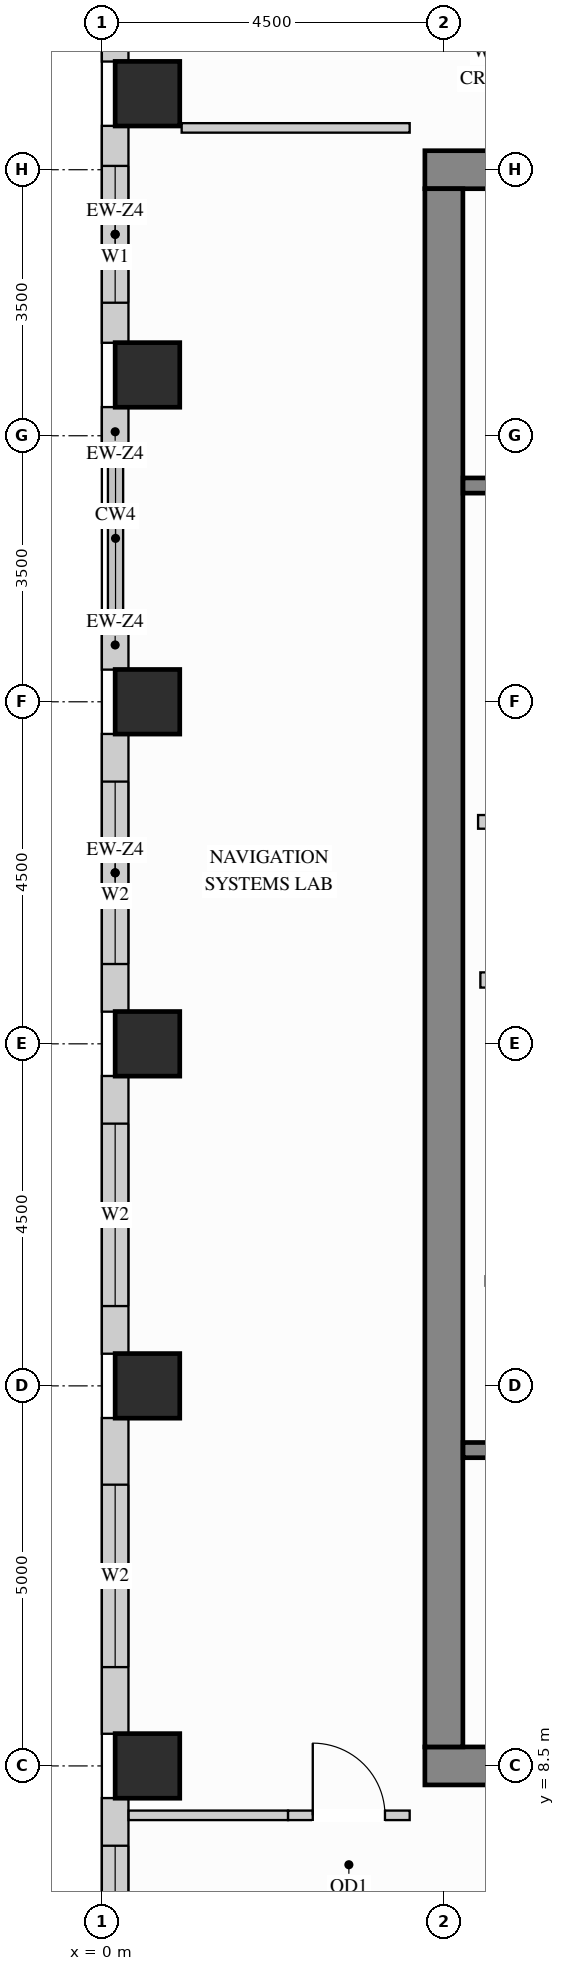
"""IFC4 building model, lengths in metres.
Left out: names, types, materials, properties, quantities, classifications, styles, units other than length and angle.
Written with IfcOpenShell. Run it as: python <this file> out.ifc"""

import sys

from ifc_helpers import new_model, si_unit, direction, frame, frame_2d, origin, origin_2d, place, context, subcontext, project, spatial, rectangle, extrude, source, transform, mapped, element, fill, save


model = new_model("IFC4")
c1 = context("Model", 3, precision=1e-05, world=origin(), true_north=direction((0.0, 1.0)))
c2 = subcontext(c1, "Body", "Model", "MODEL_VIEW")
j1 = project(units=[si_unit("LENGTHUNIT", "METRE"), si_unit("PLANEANGLEUNIT", "RADIAN")], contexts=[c1])
p1 = place(None, origin())
s1 = spatial("IfcSite", under=j1, at=p1, CompositionType="ELEMENT")
p2 = place(p1, origin())
s2 = spatial("IfcBuilding", under=s1, at=p2, CompositionType="ELEMENT")
p3 = place(p2, frame((0.0, 0.0, 212.4)))
s3 = spatial("IfcBuildingStorey", under=s2, at=p3, CompositionType="ELEMENT", Elevation=212.4)
m1 = source(origin(), c2, "Body", "SweptSolid", [
    extrude(rectangle(XDim=0.85, YDim=0.85, at=origin_2d()), origin(), (0.0, 0.0, 1.0), 3.4),
])
for number, where, z_axis, x_axis in (
    (1, (0.6, 13.5, 0.0), (0.0, 0.0, 1.0), (1.0, 0.0, 0.0)),
    (2, (0.6, 18.0, 0.0), (0.0, 0.0, 1.0), (1.0, 0.0, 0.0)),
    (3, (0.6, 22.5, 0.0), (0.0, 0.0, 1.0), (1.0, 0.0, 0.0)),
    (4, (0.6, 26.8, 0.0), (0.0, 0.0, 1.0), (1.0, 0.0, 0.0)),
    (5, (0.6, 30.5, 0.0), (0.0, 0.0, 1.0), (1.0, 0.0, 0.0)),
    (6, (0.6, 8.5, 0.0), (0.0, 0.0, 1.0), (1.0, 0.0, 0.0)),
):
    element("IfcColumn", number, at=place(p3, frame(where, z_axis=z_axis, x_axis=x_axis)), inside=s3, PredefinedType="COLUMN", context=c2, shape_type="MappedRepresentation", body=[
        mapped(m1, transform((0.0, 0.0, 0.0), x_axis=(1.0, 0.0, 0.0), y_axis=(0.0, 1.0, 0.0), z_axis=(0.0, 0.0, 1.0))),
    ])
m2 = source(origin(), c2, "Body", "SweptSolid", [
    extrude(rectangle(XDim=10.5, YDim=0.5, at=frame_2d((5.25, 0.0))), origin(), (0.0, 0.0, 1.0), 3.4),
])
for number, where, z_axis, x_axis in (
    (7, (4.25, 29.5, 0.0), (0.0, 0.0, 1.0), (1.0, 0.0, 0.0)),
    (8, (4.25, 8.5, 0.0), (0.0, 0.0, 1.0), (1.0, 0.0, 0.0)),
):
    element("IfcWall", number, at=place(p3, frame(where, z_axis=z_axis, x_axis=x_axis)), inside=s3, PredefinedType="SHEAR", context=c2, shape_type="MappedRepresentation", body=[
        mapped(m2, transform((0.0, 0.0, 0.0), x_axis=(1.0, 0.0, 0.0), y_axis=(0.0, 1.0, 0.0), z_axis=(0.0, 0.0, 1.0))),
    ])
m3 = source(origin(), c2, "Body", "SweptSolid", [
    extrude(rectangle(XDim=20.5, YDim=0.5, at=frame_2d((10.25, 0.0))), origin(), (0.0, 0.0, 1.0), 3.4),
])
p4 = place(p3, frame((4.5, 8.75, 0.0), z_axis=(0.0, 0.0, 1.0), x_axis=(0.0, 1.0, 0.0)))
e9 = element("IfcWall", 9, at=p4, inside=s3, PredefinedType="SHEAR", context=c2, shape_type="MappedRepresentation", body=[
    mapped(m3, transform((0.0, 0.0, 0.0), x_axis=(1.0, 0.0, 0.0), y_axis=(0.0, 1.0, 0.0), z_axis=(0.0, 0.0, 1.0))),
])
p5 = place(p3, frame((0.175, 34.577, 0.0), z_axis=(0.0, 0.0, 1.0), x_axis=(0.0, -1.0, 0.0)))
e10 = element("IfcWall", 10, at=p5, inside=s3, PredefinedType="SOLIDWALL", context=c2, shape_type="SweptSolid", body=[
    extrude(rectangle(XDim=3.654, YDim=0.35, at=frame_2d((1.827, 0.0))), origin(), (0.0, 0.0, 1.0), 3.385),
])
p6 = place(p5, frame((0.648, 0.0, 0.78)))
e11 = element("IfcOpeningElement", 11, at=p6, cuts=e10, PredefinedType="OPENING", context=c2, shape_type="SweptSolid", body=[
    extrude(rectangle(XDim=1.8, YDim=2.1, at=frame_2d((0.9, 1.05))), frame((0.0, 0.185, 0.0), z_axis=(0.0, -1.0, 0.0), x_axis=(1.0, 0.0, 0.0)), (0.0, 0.0, 1.0), 0.37),
])
p7 = place(p3, frame((0.175, 30.077, 0.0), z_axis=(0.0, 0.0, 1.0), x_axis=(0.0, -1.0, 0.0)))
e12 = element("IfcWall", 12, at=p7, inside=s3, PredefinedType="SOLIDWALL", context=c2, shape_type="SweptSolid", body=[
    extrude(rectangle(XDim=2.854, YDim=0.35, at=frame_2d((1.427, 0.0))), origin(), (0.0, 0.0, 1.0), 3.385),
])
p8 = place(p7, frame((0.527, 0.0, 0.78)))
e13 = element("IfcOpeningElement", 13, at=p8, cuts=e12, PredefinedType="OPENING", context=c2, shape_type="SweptSolid", body=[
    extrude(rectangle(XDim=1.8, YDim=2.1, at=frame_2d((0.9, 1.05))), frame((0.0, 0.185, 0.0), z_axis=(0.0, -1.0, 0.0), x_axis=(1.0, 0.0, 0.0)), (0.0, 0.0, 1.0), 0.37),
])
m4 = source(origin(), c2, "Body", "SweptSolid", [
    extrude(rectangle(XDim=0.527, YDim=0.35, at=frame_2d((0.263, 0.0))), origin(), (0.0, 0.0, 1.0), 3.385),
])
for number, where, z_axis, x_axis in (
    (14, (0.175, 26.377, 0.0), (0.0, 0.0, 1.0), (0.0, -1.0, 0.0)),
    (15, (0.175, 23.45, 0.0), (0.0, 0.0, 1.0), (0.0, -1.0, 0.0)),
):
    element("IfcWall", number, at=place(p3, frame(where, z_axis=z_axis, x_axis=x_axis)), inside=s3, PredefinedType="SOLIDWALL", context=c2, shape_type="MappedRepresentation", body=[
        mapped(m4, transform((0.0, 0.0, 0.0), x_axis=(1.0, 0.0, 0.0), y_axis=(0.0, 1.0, 0.0), z_axis=(0.0, 0.0, 1.0))),
    ])
p9 = place(p3, frame((0.175, 22.077, 0.0), z_axis=(0.0, 0.0, 1.0), x_axis=(0.0, -1.0, 0.0)))
e16 = element("IfcWall", 16, at=p9, inside=s3, PredefinedType="SOLIDWALL", context=c2, shape_type="SweptSolid", body=[
    extrude(rectangle(XDim=3.654, YDim=0.35, at=frame_2d((1.827, 0.0))), origin(), (0.0, 0.0, 1.0), 3.385),
])
p10 = place(p9, frame((0.627, 0.0, 0.78)))
e17 = element("IfcOpeningElement", 17, at=p10, cuts=e16, PredefinedType="OPENING", context=c2, shape_type="SweptSolid", body=[
    extrude(rectangle(XDim=2.4, YDim=2.1, at=frame_2d((1.2, 1.05))), frame((0.0, 0.185, 0.0), z_axis=(0.0, -1.0, 0.0), x_axis=(1.0, 0.0, 0.0)), (0.0, 0.0, 1.0), 0.37),
])
p11 = place(p3, frame((0.175, 17.577, 0.0), z_axis=(0.0, 0.0, 1.0), x_axis=(0.0, -1.0, 0.0)))
e18 = element("IfcWall", 18, at=p11, inside=s3, PredefinedType="SOLIDWALL", context=c2, shape_type="SweptSolid", body=[
    extrude(rectangle(XDim=3.654, YDim=0.35, at=frame_2d((1.827, 0.0))), origin(), (0.0, 0.0, 1.0), 3.385),
])
p12 = place(p11, frame((0.627, 0.0, 0.78)))
e19 = element("IfcOpeningElement", 19, at=p12, cuts=e18, PredefinedType="OPENING", context=c2, shape_type="SweptSolid", body=[
    extrude(rectangle(XDim=2.4, YDim=2.1, at=frame_2d((1.2, 1.05))), frame((0.0, 0.185, 0.0), z_axis=(0.0, -1.0, 0.0), x_axis=(1.0, 0.0, 0.0)), (0.0, 0.0, 1.0), 0.37),
])
p13 = place(p3, frame((0.175, 13.077, 0.0), z_axis=(0.0, 0.0, 1.0), x_axis=(0.0, -1.0, 0.0)))
e20 = element("IfcWall", 20, at=p13, inside=s3, PredefinedType="SOLIDWALL", context=c2, shape_type="SweptSolid", body=[
    extrude(rectangle(XDim=4.154, YDim=0.35, at=frame_2d((2.077, 0.0))), origin(), (0.0, 0.0, 1.0), 3.385),
])
p14 = place(p13, frame((0.877, 0.0, 0.78)))
e21 = element("IfcOpeningElement", 21, at=p14, cuts=e20, PredefinedType="OPENING", context=c2, shape_type="SweptSolid", body=[
    extrude(rectangle(XDim=2.4, YDim=2.1, at=frame_2d((1.2, 1.05))), frame((0.0, 0.185, 0.0), z_axis=(0.0, -1.0, 0.0), x_axis=(1.0, 0.0, 0.0)), (0.0, 0.0, 1.0), 0.37),
])
p15 = place(p3, frame((0.175, 8.077, 0.0), z_axis=(0.0, 0.0, 1.0), x_axis=(0.0, -1.0, 0.0)))
e22 = element("IfcWall", 22, at=p15, inside=s3, PredefinedType="SOLIDWALL", context=c2, shape_type="SweptSolid", body=[
    extrude(rectangle(XDim=4.154, YDim=0.35, at=frame_2d((2.077, 0.0))), origin(), (0.0, 0.0, 1.0), 3.385),
])
p16 = place(p15, frame((0.627, 0.0, 0.78)))
e23 = element("IfcOpeningElement", 23, at=p16, cuts=e22, PredefinedType="OPENING", context=c2, shape_type="SweptSolid", body=[
    extrude(rectangle(XDim=2.4, YDim=2.1, at=frame_2d((1.2, 1.05))), frame((0.0, 0.185, 0.0), z_axis=(0.0, -1.0, 0.0), x_axis=(1.0, 0.0, 0.0)), (0.0, 0.0, 1.0), 0.37),
])
m5 = source(origin(), c2, "Body", "SweptSolid", [
    extrude(rectangle(XDim=2.2, YDim=0.18, at=frame_2d((1.1, 0.0))), origin(), (0.0, 0.0, 1.0), 3.385),
])
p17 = place(p3, frame((4.95, 20.92, 0.0), z_axis=(0.0, 0.0, 1.0), x_axis=(1.0, 0.0, 0.0)))
e24 = element("IfcWall", 24, at=p17, inside=s3, PredefinedType="PARTITIONING", context=c2, shape_type="MappedRepresentation", body=[
    mapped(m5, transform((0.0, 0.0, 0.0), x_axis=(1.0, 0.0, 0.0), y_axis=(0.0, 1.0, 0.0), z_axis=(0.0, 0.0, 1.0))),
])
p18 = place(p3, frame((5.05, 14.88, 0.0), z_axis=(0.0, 0.0, 1.0), x_axis=(1.0, 0.0, 0.0)))
e25 = element("IfcWall", 25, at=p18, inside=s3, PredefinedType="PARTITIONING", context=c2, shape_type="SweptSolid", body=[
    extrude(rectangle(XDim=2.35, YDim=0.125, at=frame_2d((1.175, 0.0))), origin(), (0.0, 0.0, 1.0), 3.385),
])
p19 = place(p18, frame((0.7, 0.0, 0.0)))
e26 = element("IfcOpeningElement", 26, at=p19, cuts=e25, PredefinedType="OPENING", context=c2, shape_type="SweptSolid", body=[
    extrude(rectangle(XDim=0.85, YDim=2.1, at=frame_2d((0.425, 1.05))), frame((0.0, 0.073, 0.0), z_axis=(0.0, -1.0, 0.0), x_axis=(1.0, 0.0, 0.0)), (0.0, 0.0, 1.0), 0.145),
])
m6 = source(origin(), c2, "Body", "SweptSolid", [
    extrude(rectangle(XDim=3.0, YDim=0.125, at=frame_2d((1.5, 0.0))), origin(), (0.0, 0.0, 1.0), 3.385),
])
p20 = place(p3, frame((1.05, 30.05, 0.0), z_axis=(0.0, 0.0, 1.0), x_axis=(1.0, 0.0, 0.0)))
e27 = element("IfcWall", 27, at=p20, inside=s3, PredefinedType="PARTITIONING", context=c2, shape_type="MappedRepresentation", body=[
    mapped(m6, transform((0.0, 0.0, 0.0), x_axis=(1.0, 0.0, 0.0), y_axis=(0.0, 1.0, 0.0), z_axis=(0.0, 0.0, 1.0))),
])
m7 = source(origin(), c2, "Body", "SweptSolid", [
    extrude(rectangle(XDim=2.098, YDim=0.125, at=frame_2d((1.049, 0.0))), origin(), (0.0, 0.0, 1.0), 3.385),
])
p21 = place(p3, frame((0.352, 7.85, 0.0), z_axis=(0.0, 0.0, 1.0), x_axis=(1.0, 0.0, 0.0)))
e28 = element("IfcWall", 28, at=p21, inside=s3, PredefinedType="PARTITIONING", context=c2, shape_type="MappedRepresentation", body=[
    mapped(m7, transform((0.0, 0.0, 0.0), x_axis=(1.0, 0.0, 0.0), y_axis=(0.0, 1.0, 0.0), z_axis=(0.0, 0.0, 1.0))),
])
p22 = place(p3, frame((2.45, 7.85, 0.0), z_axis=(0.0, 0.0, 1.0), x_axis=(1.0, 0.0, 0.0)))
e29 = element("IfcWall", 29, at=p22, inside=s3, PredefinedType="PARTITIONING", context=c2, shape_type="SweptSolid", body=[
    extrude(rectangle(XDim=1.6, YDim=0.125, at=frame_2d((0.8, 0.0))), origin(), (0.0, 0.0, 1.0), 3.385),
])
p23 = place(p22, frame((0.325, 0.0, 0.0)))
e30 = element("IfcOpeningElement", 30, at=p23, cuts=e29, PredefinedType="OPENING", context=c2, shape_type="SweptSolid", body=[
    extrude(rectangle(XDim=0.95, YDim=2.15, at=frame_2d((0.475, 1.075))), frame((0.0, 0.073, 0.0), z_axis=(0.0, -1.0, 0.0), x_axis=(1.0, 0.0, 0.0)), (0.0, 0.0, 1.0), 0.145),
])
m8 = source(origin(), c2, "Body", "SweptSolid", [
    extrude(rectangle(XDim=2.09, YDim=0.2, at=frame_2d((1.045, 0.0))), origin(), (0.0, 0.0, 1.0), 3.385),
])
p24 = place(p3, frame((4.98, 18.84, 0.0), z_axis=(0.0, 0.0, 1.0), x_axis=(1.0, 0.0, 0.0)))
e31 = element("IfcWall", 31, at=p24, inside=s3, PredefinedType="PARTITIONING", context=c2, shape_type="MappedRepresentation", body=[
    mapped(m8, transform((0.0, 0.0, 0.0), x_axis=(1.0, 0.0, 0.0), y_axis=(0.0, 1.0, 0.0), z_axis=(0.0, 0.0, 1.0))),
])
p25 = place(p3, frame((4.752, 12.655, 0.0), z_axis=(0.0, 0.0, 1.0), x_axis=(1.0, 0.0, 0.0)))
e32 = element("IfcWall", 32, at=p25, inside=s3, PredefinedType="SHEAR", context=c2, shape_type="SweptSolid", body=[
    extrude(rectangle(XDim=7.653, YDim=0.2, at=frame_2d((3.827, 0.0))), origin(), (0.0, 0.0, 1.0), 3.4),
])
p26 = place(p25, frame((0.4, 0.0, 0.0)))
e33 = element("IfcOpeningElement", 33, at=p26, cuts=e32, PredefinedType="OPENING", context=c2, shape_type="SweptSolid", body=[
    extrude(rectangle(XDim=1.1, YDim=2.15, at=frame_2d((0.55, 1.075))), frame((0.0, 0.11, 0.0), z_axis=(0.0, -1.0, 0.0), x_axis=(1.0, 0.0, 0.0)), (0.0, 0.0, 1.0), 0.22),
])
p27 = place(p3, frame((4.752, 25.345, 0.0), z_axis=(0.0, 0.0, 1.0), x_axis=(1.0, 0.0, 0.0)))
e34 = element("IfcWall", 34, at=p27, inside=s3, PredefinedType="SHEAR", context=c2, shape_type="SweptSolid", body=[
    extrude(rectangle(XDim=7.653, YDim=0.2, at=frame_2d((3.827, 0.0))), origin(), (0.0, 0.0, 1.0), 3.4),
])
p28 = place(p27, frame((0.4, 0.0, 0.0)))
e35 = element("IfcOpeningElement", 35, at=p28, cuts=e34, PredefinedType="OPENING", context=c2, shape_type="SweptSolid", body=[
    extrude(rectangle(XDim=1.1, YDim=2.15, at=frame_2d((0.55, 1.075))), frame((0.0, 0.11, 0.0), z_axis=(0.0, -1.0, 0.0), x_axis=(1.0, 0.0, 0.0)), (0.0, 0.0, 1.0), 0.22),
])
m9 = source(origin(), c2, "Body", "SweptSolid", [
    extrude(rectangle(XDim=0.95, YDim=2.15, at=frame_2d((0.475, 1.075))), frame((0.0, 0.025, 0.0), z_axis=(0.0, -1.0, 0.0), x_axis=(1.0, 0.0, 0.0)), (0.0, 0.0, 1.0), 0.05),
])
p29 = place(p23, origin())
e36 = element("IfcDoor", 36, at=p29, inside=s3, OperationType="SINGLE_SWING_LEFT", PredefinedType="DOOR", context=c2, shape_type="MappedRepresentation", body=[
    mapped(m9, transform((0.0, 0.0, 0.0), x_axis=(1.0, 0.0, 0.0), y_axis=(0.0, 1.0, 0.0), z_axis=(0.0, 0.0, 1.0))),
])
fill(e30, e36)
m10 = source(origin(), c2, "Body", "SweptSolid", [
    extrude(rectangle(XDim=1.8, YDim=2.1, at=frame_2d((0.9, 1.05))), frame((0.0, 0.03, 0.0), z_axis=(0.0, -1.0, 0.0), x_axis=(1.0, 0.0, 0.0)), (0.0, 0.0, 1.0), 0.06),
])
p30 = place(p8, origin())
e37 = element("IfcWindow", 37, at=p30, inside=s3, PartitioningType="SINGLE_PANEL", PredefinedType="WINDOW", context=c2, shape_type="MappedRepresentation", body=[
    mapped(m10, transform((0.0, 0.0, 0.0), x_axis=(1.0, 0.0, 0.0), y_axis=(0.0, 1.0, 0.0), z_axis=(0.0, 0.0, 1.0))),
])
fill(e13, e37)
m11 = source(origin(), c2, "Body", "SweptSolid", [
    extrude(rectangle(XDim=2.4, YDim=2.1, at=frame_2d((1.2, 1.05))), frame((0.0, 0.03, 0.0), z_axis=(0.0, -1.0, 0.0), x_axis=(1.0, 0.0, 0.0)), (0.0, 0.0, 1.0), 0.06),
])
p31 = place(p10, origin())
e38 = element("IfcWindow", 38, at=p31, inside=s3, PartitioningType="SINGLE_PANEL", PredefinedType="WINDOW", context=c2, shape_type="MappedRepresentation", body=[
    mapped(m11, transform((0.0, 0.0, 0.0), x_axis=(1.0, 0.0, 0.0), y_axis=(0.0, 1.0, 0.0), z_axis=(0.0, 0.0, 1.0))),
])
fill(e17, e38)
p32 = place(p12, origin())
e39 = element("IfcWindow", 39, at=p32, inside=s3, PartitioningType="SINGLE_PANEL", PredefinedType="WINDOW", context=c2, shape_type="MappedRepresentation", body=[
    mapped(m11, transform((0.0, 0.0, 0.0), x_axis=(1.0, 0.0, 0.0), y_axis=(0.0, 1.0, 0.0), z_axis=(0.0, 0.0, 1.0))),
])
fill(e19, e39)
p33 = place(p14, origin())
e40 = element("IfcWindow", 40, at=p33, inside=s3, PartitioningType="SINGLE_PANEL", PredefinedType="WINDOW", context=c2, shape_type="MappedRepresentation", body=[
    mapped(m11, transform((0.0, 0.0, 0.0), x_axis=(1.0, 0.0, 0.0), y_axis=(0.0, 1.0, 0.0), z_axis=(0.0, 0.0, 1.0))),
])
fill(e21, e40)
p34 = place(p16, origin())
e41 = element("IfcWindow", 41, at=p34, inside=s3, PartitioningType="SINGLE_PANEL", PredefinedType="WINDOW", context=c2, shape_type="MappedRepresentation", body=[
    mapped(m11, transform((0.0, 0.0, 0.0), x_axis=(1.0, 0.0, 0.0), y_axis=(0.0, 1.0, 0.0), z_axis=(0.0, 0.0, 1.0))),
])
fill(e23, e41)
save(model, sys.argv[1])
